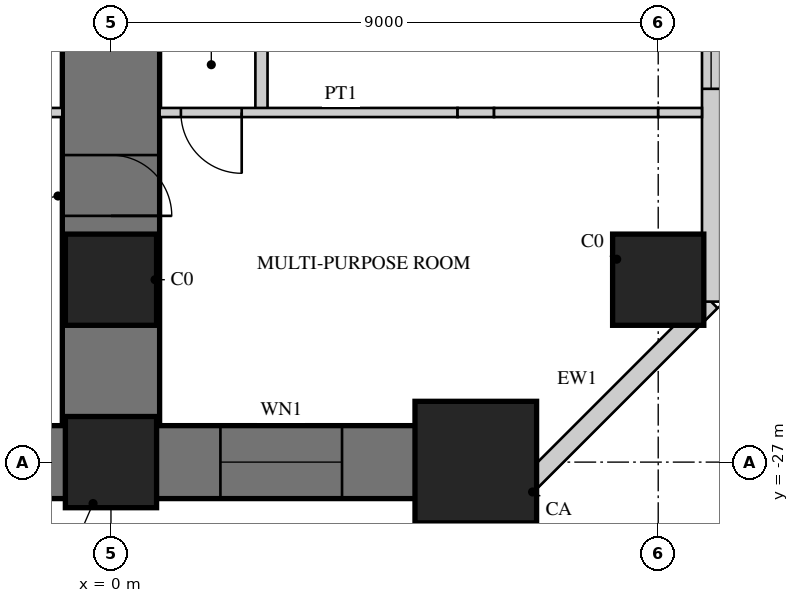
"""IFC4 building model, lengths in metres.
Left out: names, types, materials, properties, quantities, classifications, styles, units other than length and angle.
Written with IfcOpenShell. Run it as: python <this file> out.ifc"""

import sys

from ifc_helpers import new_model, si_unit, direction, frame, frame_2d, origin, origin_2d, place, context, subcontext, project, spatial, rectangle, hollow_rectangle, extrude, element, fill, save


model = new_model("IFC4")
c1 = context("Model", 3, precision=1e-05, world=origin(), true_north=direction((0.0, 1.0)))
c2 = subcontext(c1, "Body", "Model", "MODEL_VIEW")
j1 = project(units=[si_unit("LENGTHUNIT", "METRE"), si_unit("PLANEANGLEUNIT", "RADIAN")], contexts=[c1])
p1 = place(None, origin())
s1 = spatial("IfcSite", under=j1, at=p1, CompositionType="ELEMENT")
p2 = place(p1, origin())
s2 = spatial("IfcBuilding", under=s1, at=p2, CompositionType="ELEMENT")
p3 = place(p2, frame((0.0, 0.0, 9.5)))
s3 = spatial("IfcBuildingStorey", under=s2, at=p3, CompositionType="ELEMENT", Elevation=9.5)
p4 = place(p3, frame((0.0, -9.0, 0.0), z_axis=(0.0, 0.0, 1.0), x_axis=(0.0, -1.0, 0.0)))
e1 = element("IfcWall", 1, at=p4, inside=s3, PredefinedType="SHEAR", context=c2, shape_type="SweptSolid", body=[
    extrude(rectangle(XDim=18.0, YDim=1.6, at=frame_2d((9.0, 0.0))), origin(), (0.0, 0.0, 1.0), 4.5),
])
p5 = place(p4, frame((1.85, 0.0, 0.0)))
e2 = element("IfcOpeningElement", 2, at=p5, cuts=e1, PredefinedType="OPENING", context=c2, shape_type="SweptSolid", body=[
    extrude(rectangle(XDim=1.0, YDim=2.2, at=frame_2d((0.5, 1.1))), frame((0.0, 0.81, 0.0), z_axis=(0.0, -1.0, 0.0), x_axis=(1.0, 0.0, 0.0)), (0.0, 0.0, 1.0), 1.62),
])
p6 = place(p4, frame((7.2, 0.0, 0.0)))
e3 = element("IfcOpeningElement", 3, at=p6, cuts=e1, PredefinedType="OPENING", context=c2, shape_type="SweptSolid", body=[
    extrude(rectangle(XDim=1.0, YDim=2.2, at=frame_2d((0.5, 1.1))), frame((0.0, 0.81, 0.0), z_axis=(0.0, -1.0, 0.0), x_axis=(1.0, 0.0, 0.0)), (0.0, 0.0, 1.0), 1.62),
])
p7 = place(p4, frame((12.95, 0.0, 0.0)))
e4 = element("IfcOpeningElement", 4, at=p7, cuts=e1, PredefinedType="OPENING", context=c2, shape_type="SweptSolid", body=[
    extrude(rectangle(XDim=1.0, YDim=2.2, at=frame_2d((0.5, 1.1))), frame((0.0, 0.81, 0.0), z_axis=(0.0, -1.0, 0.0), x_axis=(1.0, 0.0, 0.0)), (0.0, 0.0, 1.0), 1.62),
])
p8 = place(p3, frame((-6.0, -27.0, 0.0), z_axis=(0.0, 0.0, 1.0), x_axis=(1.0, 0.0, 0.0)))
e5 = element("IfcWall", 5, at=p8, inside=s3, PredefinedType="SHEAR", context=c2, shape_type="SweptSolid", body=[
    extrude(rectangle(XDim=12.0, YDim=1.2, at=frame_2d((6.0, 0.0))), origin(), (0.0, 0.0, 1.0), 4.5),
])
p9 = place(p8, frame((2.2, 0.0, 0.9)))
e6 = element("IfcOpeningElement", 6, at=p9, cuts=e5, PredefinedType="OPENING", context=c2, shape_type="SweptSolid", body=[
    extrude(rectangle(XDim=2.0, YDim=1.8, at=frame_2d((1.0, 0.9))), frame((0.0, 0.61, 0.0), z_axis=(0.0, -1.0, 0.0), x_axis=(1.0, 0.0, 0.0)), (0.0, 0.0, 1.0), 1.22),
])
p10 = place(p8, frame((7.8, 0.0, 0.9)))
e7 = element("IfcOpeningElement", 7, at=p10, cuts=e5, PredefinedType="OPENING", context=c2, shape_type="SweptSolid", body=[
    extrude(rectangle(XDim=2.0, YDim=1.8, at=frame_2d((1.0, 0.9))), frame((0.0, 0.61, 0.0), z_axis=(0.0, -1.0, 0.0), x_axis=(1.0, 0.0, 0.0)), (0.0, 0.0, 1.0), 1.22),
])
for number, where, z_axis, x_axis in (
    (8, (9.0, -24.0, 0.0), (0.0, 0.0, 1.0), (1.0, 0.0, 0.0)),
    (9, (0.0, -27.0, 0.0), (0.0, 0.0, 1.0), (1.0, 0.0, 0.0)),
):
    element("IfcColumn", number, at=place(p3, frame(where, z_axis=z_axis, x_axis=x_axis)), inside=s3, PredefinedType="COLUMN", context=c2, shape_type="SweptSolid", body=[
        extrude(rectangle(XDim=1.5, YDim=1.5, at=origin_2d()), origin(), (0.0, 0.0, 1.0), 4.5),
    ])
p11 = place(p3, frame((6.0, -27.0, 0.0), z_axis=(0.0, 0.0, 1.0), x_axis=(1.0, 0.0, 0.0)))
e10 = element("IfcColumn", 10, at=p11, inside=s3, PredefinedType="COLUMN", context=c2, shape_type="SweptSolid", body=[
    extrude(rectangle(XDim=2.0, YDim=2.0, at=origin_2d()), origin(), (0.0, 0.0, 1.0), 4.5),
])
p12 = place(p3, frame((0.0, -24.0, 0.0), z_axis=(0.0, 0.0, 1.0), x_axis=(1.0, 0.0, 0.0)))
e11 = element("IfcColumn", 11, at=p12, inside=s3, PredefinedType="COLUMN", context=c2, shape_type="SweptSolid", body=[
    extrude(rectangle(XDim=1.5, YDim=1.5, at=origin_2d()), origin(), (0.0, 0.0, 1.0), 4.5),
])
p13 = place(p3, frame((6.63, -27.6, 0.0), z_axis=(0.0, 0.0, 1.0), x_axis=(0.707106781187, 0.707106781187, 0.0)))
e12 = element("IfcWall", 12, at=p13, inside=s3, PredefinedType="SOLIDWALL", context=c2, shape_type="SweptSolid", body=[
    extrude(rectangle(XDim=4.582, YDim=0.3, at=frame_2d((2.291, 0.0))), origin(), (0.0, 0.0, 1.0), 4.3),
])
p14 = place(p3, frame((9.87, -24.36, 0.0), z_axis=(0.0, 0.0, 1.0), x_axis=(0.0, 1.0, 0.0)))
e13 = element("IfcWall", 13, at=p14, inside=s3, PredefinedType="SOLIDWALL", context=c2, shape_type="SweptSolid", body=[
    extrude(rectangle(XDim=6.0, YDim=0.3, at=frame_2d((3.0, 0.0))), origin(), (0.0, 0.0, 1.0), 4.3),
])
p15 = place(p14, frame((3.5, 0.0, 0.9)))
e14 = element("IfcOpeningElement", 14, at=p15, cuts=e13, PredefinedType="OPENING", context=c2, shape_type="SweptSolid", body=[
    extrude(rectangle(XDim=2.0, YDim=1.8, at=frame_2d((1.0, 0.9))), frame((0.0, 0.16, 0.0), z_axis=(0.0, -1.0, 0.0), x_axis=(1.0, 0.0, 0.0)), (0.0, 0.0, 1.0), 0.32),
])
p16 = place(p3, frame((2.475, -9.65, 0.0), z_axis=(0.0, 0.0, 1.0), x_axis=(0.0, -1.0, 0.0)))
e15 = element("IfcWall", 15, at=p16, inside=s3, PredefinedType="SOLIDWALL", context=c2, shape_type="SweptSolid", body=[
    extrude(rectangle(XDim=11.6, YDim=0.2, at=frame_2d((5.8, 0.0))), origin(), (0.0, 0.0, 1.0), 4.3),
])
p17 = place(p16, frame((1.2, 0.0, 0.0)))
e16 = element("IfcOpeningElement", 16, at=p17, cuts=e15, PredefinedType="OPENING", context=c2, shape_type="SweptSolid", body=[
    extrude(rectangle(XDim=1.0, YDim=2.2, at=frame_2d((0.5, 1.1))), frame((0.0, 0.11, 0.0), z_axis=(0.0, -1.0, 0.0), x_axis=(1.0, 0.0, 0.0)), (0.0, 0.0, 1.0), 0.22),
])
p18 = place(p16, frame((3.6, 0.0, 0.0)))
e17 = element("IfcOpeningElement", 17, at=p18, cuts=e15, PredefinedType="OPENING", context=c2, shape_type="SweptSolid", body=[
    extrude(rectangle(XDim=1.0, YDim=2.2, at=frame_2d((0.5, 1.1))), frame((0.0, 0.11, 0.0), z_axis=(0.0, -1.0, 0.0), x_axis=(1.0, 0.0, 0.0)), (0.0, 0.0, 1.0), 0.22),
])
p19 = place(p16, frame((6.55, 0.0, 0.0)))
e18 = element("IfcOpeningElement", 18, at=p19, cuts=e15, PredefinedType="OPENING", context=c2, shape_type="SweptSolid", body=[
    extrude(rectangle(XDim=1.0, YDim=2.2, at=frame_2d((0.5, 1.1))), frame((0.0, 0.11, 0.0), z_axis=(0.0, -1.0, 0.0), x_axis=(1.0, 0.0, 0.0)), (0.0, 0.0, 1.0), 0.22),
])
p20 = place(p3, frame((-5.7, -21.25, 0.0), z_axis=(0.0, 0.0, 1.0), x_axis=(1.0, 0.0, 0.0)))
e19 = element("IfcWall", 19, at=p20, inside=s3, PredefinedType="PARTITIONING", context=c2, shape_type="SweptSolid", body=[
    extrude(rectangle(XDim=4.9, YDim=0.15, at=frame_2d((2.45, 0.0))), origin(), (0.0, 0.0, 1.0), 3.35),
])
p21 = place(p3, frame((0.8, -21.25, 0.0), z_axis=(0.0, 0.0, 1.0), x_axis=(1.0, 0.0, 0.0)))
e20 = element("IfcWall", 20, at=p21, inside=s3, PredefinedType="PARTITIONING", context=c2, shape_type="SweptSolid", body=[
    extrude(rectangle(XDim=4.9, YDim=0.15, at=frame_2d((2.45, 0.0))), origin(), (0.0, 0.0, 1.0), 3.35),
])
p22 = place(p21, frame((0.35, 0.0, 0.0)))
e21 = element("IfcOpeningElement", 21, at=p22, cuts=e20, PredefinedType="OPENING", context=c2, shape_type="SweptSolid", body=[
    extrude(rectangle(XDim=1.0, YDim=2.2, at=frame_2d((0.5, 1.1))), frame((0.0, 0.085, 0.0), z_axis=(0.0, -1.0, 0.0), x_axis=(1.0, 0.0, 0.0)), (0.0, 0.0, 1.0), 0.17),
])
p23 = place(p3, frame((5.7, -21.25, 0.0), z_axis=(0.0, 0.0, 1.0), x_axis=(1.0, 0.0, 0.0)))
e22 = element("IfcWall", 22, at=p23, inside=s3, PredefinedType="PARTITIONING", context=c2, shape_type="SweptSolid", body=[
    extrude(rectangle(XDim=0.6, YDim=0.15, at=frame_2d((0.3, 0.0))), origin(), (0.0, 0.0, 1.0), 4.3),
])
p24 = place(p3, frame((6.3, -21.25, 0.0), z_axis=(0.0, 0.0, 1.0), x_axis=(1.0, 0.0, 0.0)))
e23 = element("IfcWall", 23, at=p24, inside=s3, PredefinedType="PARTITIONING", context=c2, shape_type="SweptSolid", body=[
    extrude(rectangle(XDim=2.7, YDim=0.15, at=frame_2d((1.35, 0.0))), origin(), (0.0, 0.0, 1.0), 3.35),
])
p25 = place(p3, frame((9.0, -21.25, 0.0), z_axis=(0.0, 0.0, 1.0), x_axis=(1.0, 0.0, 0.0)))
e24 = element("IfcWall", 24, at=p25, inside=s3, PredefinedType="PARTITIONING", context=c2, shape_type="SweptSolid", body=[
    extrude(rectangle(XDim=0.72, YDim=0.15, at=frame_2d((0.36, 0.0))), origin(), (0.0, 0.0, 1.0), 4.3),
])
p26 = place(p10, origin())
e25 = element("IfcWindow", 25, at=p26, inside=s3, PartitioningType="SINGLE_PANEL", PredefinedType="WINDOW", context=c2, shape_type="SweptSolid", body=[
    extrude(hollow_rectangle(XDim=2.0, YDim=1.8, WallThickness=0.06, at=frame_2d((1.0, 0.9))), frame((0.0, 0.03, 0.0), z_axis=(0.0, -1.0, 0.0), x_axis=(1.0, 0.0, 0.0)), (0.0, 0.0, 1.0), 0.06),
    extrude(rectangle(XDim=1.879, YDim=1.679, at=frame_2d((1.0, 0.9))), frame((0.0, 0.03, 0.0), z_axis=(0.0, -1.0, 0.0), x_axis=(1.0, 0.0, 0.0)), (0.0, 0.0, 1.0), 0.06),
])
fill(e7, e25)
p27 = place(p15, origin())
e26 = element("IfcWindow", 26, at=p27, inside=s3, PartitioningType="SINGLE_PANEL", PredefinedType="WINDOW", context=c2, shape_type="SweptSolid", body=[
    extrude(hollow_rectangle(XDim=2.0, YDim=1.8, WallThickness=0.06, at=frame_2d((1.0, 0.9))), frame((0.0, 0.03, 0.0), z_axis=(0.0, -1.0, 0.0), x_axis=(1.0, 0.0, 0.0)), (0.0, 0.0, 1.0), 0.06),
    extrude(rectangle(XDim=1.879, YDim=1.679, at=frame_2d((1.0, 0.9))), frame((0.0, 0.03, 0.0), z_axis=(0.0, -1.0, 0.0), x_axis=(1.0, 0.0, 0.0)), (0.0, 0.0, 1.0), 0.06),
])
fill(e14, e26)
p28 = place(p22, frame((1.0, 0.0, 0.0), z_axis=(0.0, 0.0, 1.0), x_axis=(-1.0, 0.0, 0.0)))
e27 = element("IfcDoor", 27, at=p28, inside=s3, OperationType="SINGLE_SWING_LEFT", PredefinedType="DOOR", context=c2, shape_type="SweptSolid", body=[
    extrude(rectangle(XDim=1.0, YDim=2.2, at=frame_2d((0.5, 1.1))), frame((0.0, 0.025, 0.0), z_axis=(0.0, -1.0, 0.0), x_axis=(1.0, 0.0, 0.0)), (0.0, 0.0, 1.0), 0.05),
])
fill(e21, e27)
p29 = place(p7, origin())
e28 = element("IfcDoor", 28, at=p29, inside=s3, OperationType="SINGLE_SWING_RIGHT", PredefinedType="DOOR", context=c2, shape_type="SweptSolid", body=[
    extrude(rectangle(XDim=1.0, YDim=2.2, at=frame_2d((0.5, 1.1))), frame((0.0, 0.025, 0.0), z_axis=(0.0, -1.0, 0.0), x_axis=(1.0, 0.0, 0.0)), (0.0, 0.0, 1.0), 0.05),
])
fill(e4, e28)
save(model, sys.argv[1])
